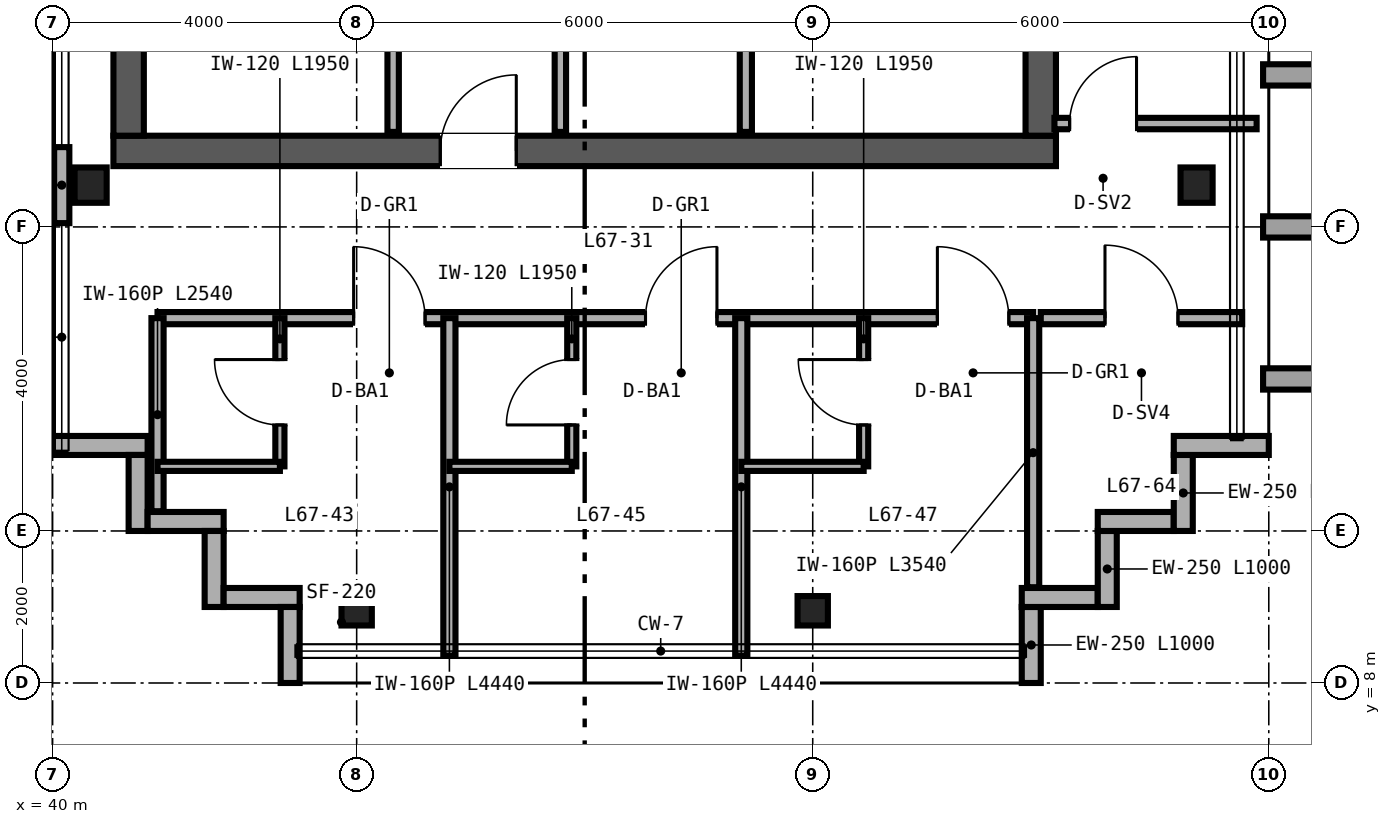
"""IFC4 building model, lengths in metres.
Left out: names, types, materials, properties, quantities, classifications, styles, units other than length and angle.
Written with IfcOpenShell. Run it as: python <this file> out.ifc"""

import sys

from ifc_helpers import new_model, si_unit, direction, frame, frame_2d, origin, origin_2d, place, context, subcontext, project, spatial, rectangle, i_section, extrude, source, transform, mapped, element, fill, save


model = new_model("IFC4")
c1 = context("Model", 3, precision=1e-05, world=origin(), true_north=direction((0.0, 1.0)))
c2 = subcontext(c1, "Body", "Model", "MODEL_VIEW")
j1 = project(units=[si_unit("LENGTHUNIT", "METRE"), si_unit("PLANEANGLEUNIT", "RADIAN")], contexts=[c1])
p1 = place(None, origin())
s1 = spatial("IfcSite", under=j1, at=p1, CompositionType="ELEMENT")
p2 = place(p1, origin())
s2 = spatial("IfcBuilding", under=s1, at=p2, CompositionType="ELEMENT")
p3 = place(p2, frame((0.0, 0.0, 265.2)))
s3 = spatial("IfcBuildingStorey", under=s2, at=p3, CompositionType="ELEMENT", Elevation=265.2)
p4 = place(p3, frame((40.8, 15.0, 0.0), z_axis=(0.0, 0.0, 1.0), x_axis=(1.0, 0.0, 0.0)))
e1 = element("IfcWall", 1, at=p4, inside=s3, PredefinedType="SHEAR", context=c2, shape_type="SweptSolid", body=[
    extrude(rectangle(XDim=12.4, YDim=0.4, at=frame_2d((6.2, 0.0))), origin(), (0.0, 0.0, 1.0), 3.38),
])
p5 = place(p4, frame((4.3, 0.0, 0.0)))
e2 = element("IfcOpeningElement", 2, at=p5, cuts=e1, PredefinedType="OPENING", context=c2, shape_type="SweptSolid", body=[
    extrude(rectangle(XDim=1.0, YDim=2.15, at=frame_2d((0.5, 1.075))), frame((0.0, 0.21, 0.0), z_axis=(0.0, -1.0, 0.0), x_axis=(1.0, 0.0, 0.0)), (0.0, 0.0, 1.0), 0.42),
])
for number, where, z_axis, x_axis in (
    (3, (41.0, 15.2, 0.0), (0.0, 0.0, 1.0), (0.0, 1.0, 0.0)),
    (4, (53.0, 15.2, 0.0), (0.0, 0.0, 1.0), (0.0, 1.0, 0.0)),
):
    element("IfcWall", number, at=place(p3, frame(where, z_axis=z_axis, x_axis=x_axis)), inside=s3, PredefinedType="SHEAR", context=c2, shape_type="SweptSolid", body=[
        extrude(rectangle(XDim=21.6, YDim=0.4, at=frame_2d((10.8, 0.0))), origin(), (0.0, 0.0, 1.0), 3.38),
    ])
m1 = source(origin(), c2, "Body", "SweptSolid", [
    extrude(i_section(OverallWidth=0.422, OverallDepth=0.465, WebThickness=0.045, FlangeThickness=0.073, FilletRadius=0.025, at=origin_2d()), origin(), (0.0, 0.0, 1.0), 3.38),
])
for number, where, z_axis, x_axis in (
    (5, (40.5, 14.55, 0.0), (0.0, 0.0, 1.0), (1.0, 0.0, 0.0)),
    (6, (55.05, 14.55, 0.0), (0.0, 0.0, 1.0), (1.0, 0.0, 0.0)),
):
    element("IfcColumn", number, at=place(p3, frame(where, z_axis=z_axis, x_axis=x_axis)), inside=s3, PredefinedType="COLUMN", context=c2, shape_type="MappedRepresentation", body=[
        mapped(m1, transform((0.0, 0.0, 0.0), scale=1.0)),
    ])
m2 = source(origin(), c2, "Body", "SweptSolid", [
    extrude(i_section(OverallWidth=0.399, OverallDepth=0.387, WebThickness=0.021, FlangeThickness=0.033, FilletRadius=0.025, at=origin_2d()), origin(), (0.0, 0.0, 1.0), 3.38),
])
for number, where, z_axis, x_axis in (
    (7, (44.0, 8.95, 0.0), (0.0, 0.0, 1.0), (1.0, 0.0, 0.0)),
    (8, (50.0, 8.95, 0.0), (0.0, 0.0, 1.0), (1.0, 0.0, 0.0)),
):
    element("IfcColumn", number, at=place(p3, frame(where, z_axis=z_axis, x_axis=x_axis)), inside=s3, PredefinedType="COLUMN", context=c2, shape_type="MappedRepresentation", body=[
        mapped(m2, transform((0.0, 0.0, 0.0), scale=1.0)),
    ])
for number, where, z_axis, x_axis in (
    (9, (52.875, 8.0, 0.0), (0.0, 0.0, 1.0), (0.0, 1.0, 0.0)),
    (10, (52.75, 9.125, 0.0), (0.0, 0.0, 1.0), (1.0, 0.0, 0.0)),
    (11, (53.875, 9.0, 0.0), (0.0, 0.0, 1.0), (0.0, 1.0, 0.0)),
    (12, (53.75, 10.125, 0.0), (0.0, 0.0, 1.0), (1.0, 0.0, 0.0)),
    (13, (54.875, 10.0, 0.0), (0.0, 0.0, 1.0), (0.0, 1.0, 0.0)),
):
    element("IfcWall", number, at=place(p3, frame(where, z_axis=z_axis, x_axis=x_axis)), inside=s3, PredefinedType="SOLIDWALL", context=c2, shape_type="SweptSolid", body=[
        extrude(rectangle(XDim=1.0, YDim=0.25, at=frame_2d((0.5, 0.0))), origin(), (0.0, 0.0, 1.0), 3.38),
    ])
for number, where, z_axis, x_axis in (
    (14, (54.75, 11.125, 0.0), (0.0, 0.0, 1.0), (1.0, 0.0, 0.0)),
    (15, (40.0, 11.125, 0.0), (0.0, 0.0, 1.0), (1.0, 0.0, 0.0)),
):
    element("IfcWall", number, at=place(p3, frame(where, z_axis=z_axis, x_axis=x_axis)), inside=s3, PredefinedType="SOLIDWALL", context=c2, shape_type="SweptSolid", body=[
        extrude(rectangle(XDim=1.25, YDim=0.25, at=frame_2d((0.625, 0.0))), origin(), (0.0, 0.0, 1.0), 3.38),
    ])
for number, where, z_axis, x_axis in (
    (16, (41.125, 11.0, 0.0), (0.0, 0.0, 1.0), (0.0, -1.0, 0.0)),
    (17, (41.25, 10.125, 0.0), (0.0, 0.0, 1.0), (1.0, 0.0, 0.0)),
    (18, (42.125, 10.0, 0.0), (0.0, 0.0, 1.0), (0.0, -1.0, 0.0)),
    (19, (42.25, 9.125, 0.0), (0.0, 0.0, 1.0), (1.0, 0.0, 0.0)),
    (20, (43.125, 9.0, 0.0), (0.0, 0.0, 1.0), (0.0, -1.0, 0.0)),
):
    element("IfcWall", number, at=place(p3, frame(where, z_axis=z_axis, x_axis=x_axis)), inside=s3, PredefinedType="SOLIDWALL", context=c2, shape_type="SweptSolid", body=[
        extrude(rectangle(XDim=1.0, YDim=0.25, at=frame_2d((0.5, 0.0))), origin(), (0.0, 0.0, 1.0), 3.38),
    ])
p6 = place(p3, frame((40.12, 14.05, 0.0), z_axis=(0.0, 0.0, 1.0), x_axis=(0.0, 1.0, 0.0)))
e21 = element("IfcWall", 21, at=p6, inside=s3, PredefinedType="PARAPET", context=c2, shape_type="SweptSolid", body=[
    extrude(rectangle(XDim=1.0, YDim=0.2, at=frame_2d((0.5, 0.0))), origin(), (0.0, 0.0, 1.0), 3.38),
])
p7 = place(p3, frame((46.68, 15.25, 0.0), z_axis=(0.0, 0.0, 1.0), x_axis=(0.0, 1.0, 0.0)))
e22 = element("IfcWall", 22, at=p7, inside=s3, PredefinedType="PARTITIONING", context=c2, shape_type="SweptSolid", body=[
    extrude(rectangle(XDim=16.13, YDim=0.15, at=frame_2d((8.065, 0.0))), origin(), (0.0, 0.0, 1.0), 2.453),
])
p8 = place(p7, frame((3.2, 0.0, 0.0)))
e23 = element("IfcOpeningElement", 23, at=p8, cuts=e22, PredefinedType="OPENING", context=c2, shape_type="SweptSolid", body=[
    extrude(rectangle(XDim=0.88, YDim=2.15, at=frame_2d((0.44, 1.075))), frame((0.0, 0.085, 0.0), z_axis=(0.0, -1.0, 0.0), x_axis=(1.0, 0.0, 0.0)), (0.0, 0.0, 1.0), 0.17),
])
p9 = place(p7, frame((11.2, 0.0, 0.0)))
e24 = element("IfcOpeningElement", 24, at=p9, cuts=e22, PredefinedType="OPENING", context=c2, shape_type="SweptSolid", body=[
    extrude(rectangle(XDim=0.88, YDim=2.15, at=frame_2d((0.44, 1.075))), frame((0.0, 0.085, 0.0), z_axis=(0.0, -1.0, 0.0), x_axis=(1.0, 0.0, 0.0)), (0.0, 0.0, 1.0), 0.17),
])
p10 = place(p3, frame((49.12, 15.25, 0.0), z_axis=(0.0, 0.0, 1.0), x_axis=(0.0, 1.0, 0.0)))
e25 = element("IfcWall", 25, at=p10, inside=s3, PredefinedType="PARTITIONING", context=c2, shape_type="SweptSolid", body=[
    extrude(rectangle(XDim=16.13, YDim=0.16, at=frame_2d((8.065, 0.0))), origin(), (0.0, 0.0, 1.0), 2.453),
])
p11 = place(p10, frame((2.2, 0.0, 0.0)))
e26 = element("IfcOpeningElement", 26, at=p11, cuts=e25, PredefinedType="OPENING", context=c2, shape_type="SweptSolid", body=[
    extrude(rectangle(XDim=0.9, YDim=2.15, at=frame_2d((0.45, 1.075))), frame((0.0, 0.09, 0.0), z_axis=(0.0, -1.0, 0.0), x_axis=(1.0, 0.0, 0.0)), (0.0, 0.0, 1.0), 0.18),
])
p12 = place(p10, frame((8.2, 0.0, 0.0)))
e27 = element("IfcOpeningElement", 27, at=p12, cuts=e25, PredefinedType="OPENING", context=c2, shape_type="SweptSolid", body=[
    extrude(rectangle(XDim=0.9, YDim=2.15, at=frame_2d((0.45, 1.075))), frame((0.0, 0.09, 0.0), z_axis=(0.0, -1.0, 0.0), x_axis=(1.0, 0.0, 0.0)), (0.0, 0.0, 1.0), 0.18),
])
p13 = place(p10, frame((13.5, 0.0, 0.0)))
e28 = element("IfcOpeningElement", 28, at=p13, cuts=e25, PredefinedType="OPENING", context=c2, shape_type="SweptSolid", body=[
    extrude(rectangle(XDim=0.9, YDim=2.15, at=frame_2d((0.45, 1.075))), frame((0.0, 0.09, 0.0), z_axis=(0.0, -1.0, 0.0), x_axis=(1.0, 0.0, 0.0)), (0.0, 0.0, 1.0), 0.18),
])
p14 = place(p3, frame((44.48, 15.25, 0.0), z_axis=(0.0, 0.0, 1.0), x_axis=(0.0, 1.0, 0.0)))
e29 = element("IfcWall", 29, at=p14, inside=s3, PredefinedType="PARTITIONING", context=c2, shape_type="SweptSolid", body=[
    extrude(rectangle(XDim=16.13, YDim=0.15, at=frame_2d((8.065, 0.0))), origin(), (0.0, 0.0, 1.0), 2.453),
])
p15 = place(p14, frame((2.2, 0.0, 0.0)))
e30 = element("IfcOpeningElement", 30, at=p15, cuts=e29, PredefinedType="OPENING", context=c2, shape_type="SweptSolid", body=[
    extrude(rectangle(XDim=0.9, YDim=2.15, at=frame_2d((0.45, 1.075))), frame((0.0, 0.085, 0.0), z_axis=(0.0, -1.0, 0.0), x_axis=(1.0, 0.0, 0.0)), (0.0, 0.0, 1.0), 0.17),
])
p16 = place(p14, frame((10.13, 0.0, 0.0)))
e31 = element("IfcOpeningElement", 31, at=p16, cuts=e29, PredefinedType="OPENING", context=c2, shape_type="SweptSolid", body=[
    extrude(rectangle(XDim=0.9, YDim=2.15, at=frame_2d((0.45, 1.075))), frame((0.0, 0.085, 0.0), z_axis=(0.0, -1.0, 0.0), x_axis=(1.0, 0.0, 0.0)), (0.0, 0.0, 1.0), 0.17),
])
p17 = place(p3, frame((41.38, 12.8, 0.0), z_axis=(0.0, 0.0, 1.0), x_axis=(1.0, 0.0, 0.0)))
e32 = element("IfcWall", 32, at=p17, inside=s3, PredefinedType="PARTITIONING", context=c2, shape_type="SweptSolid", body=[
    extrude(rectangle(XDim=11.52, YDim=0.16, at=frame_2d((5.76, 0.0))), origin(), (0.0, 0.0, 1.0), 3.38),
])
p18 = place(p17, frame((2.58, 0.0, 0.0)))
e33 = element("IfcOpeningElement", 33, at=p18, cuts=e32, PredefinedType="OPENING", context=c2, shape_type="SweptSolid", body=[
    extrude(rectangle(XDim=0.94, YDim=2.15, at=frame_2d((0.47, 1.075))), frame((0.0, 0.09, 0.0), z_axis=(0.0, -1.0, 0.0), x_axis=(1.0, 0.0, 0.0)), (0.0, 0.0, 1.0), 0.18),
])
p19 = place(p17, frame((6.42, 0.0, 0.0)))
e34 = element("IfcOpeningElement", 34, at=p19, cuts=e32, PredefinedType="OPENING", context=c2, shape_type="SweptSolid", body=[
    extrude(rectangle(XDim=0.94, YDim=2.15, at=frame_2d((0.47, 1.075))), frame((0.0, 0.09, 0.0), z_axis=(0.0, -1.0, 0.0), x_axis=(1.0, 0.0, 0.0)), (0.0, 0.0, 1.0), 0.18),
])
p20 = place(p17, frame((10.26, 0.0, 0.0)))
e35 = element("IfcOpeningElement", 35, at=p20, cuts=e32, PredefinedType="OPENING", context=c2, shape_type="SweptSolid", body=[
    extrude(rectangle(XDim=0.94, YDim=2.15, at=frame_2d((0.47, 1.075))), frame((0.0, 0.09, 0.0), z_axis=(0.0, -1.0, 0.0), x_axis=(1.0, 0.0, 0.0)), (0.0, 0.0, 1.0), 0.18),
])
p21 = place(p3, frame((41.38, 10.26, 0.0), z_axis=(0.0, 0.0, 1.0), x_axis=(0.0, 1.0, 0.0)))
e36 = element("IfcWall", 36, at=p21, inside=s3, PredefinedType="PARTITIONING", context=c2, shape_type="SweptSolid", body=[
    extrude(rectangle(XDim=2.54, YDim=0.16, at=frame_2d((1.27, 0.0))), origin(), (0.0, 0.0, 1.0), 3.38),
])
p22 = place(p3, frame((52.9, 9.26, 0.0), z_axis=(0.0, 0.0, 1.0), x_axis=(0.0, 1.0, 0.0)))
e37 = element("IfcWall", 37, at=p22, inside=s3, PredefinedType="PARTITIONING", context=c2, shape_type="SweptSolid", body=[
    extrude(rectangle(XDim=3.54, YDim=0.16, at=frame_2d((1.77, 0.0))), origin(), (0.0, 0.0, 1.0), 3.38),
])
p23 = place(p3, frame((45.22, 8.36, 0.0), z_axis=(0.0, 0.0, 1.0), x_axis=(0.0, 1.0, 0.0)))
e38 = element("IfcWall", 38, at=p23, inside=s3, PredefinedType="PARTITIONING", context=c2, shape_type="SweptSolid", body=[
    extrude(rectangle(XDim=4.44, YDim=0.16, at=frame_2d((2.22, 0.0))), origin(), (0.0, 0.0, 1.0), 2.687),
])
p24 = place(p3, frame((42.99, 10.85, 0.0), z_axis=(0.0, 0.0, 1.0), x_axis=(0.0, 1.0, 0.0)))
e39 = element("IfcWall", 39, at=p24, inside=s3, PredefinedType="PARTITIONING", context=c2, shape_type="SweptSolid", body=[
    extrude(rectangle(XDim=1.95, YDim=0.12, at=frame_2d((0.975, 0.0))), origin(), (0.0, 0.0, 1.0), 3.38),
])
p25 = place(p24, frame((0.545, 0.0, 0.0)))
e40 = element("IfcOpeningElement", 40, at=p25, cuts=e39, PredefinedType="OPENING", context=c2, shape_type="SweptSolid", body=[
    extrude(rectangle(XDim=0.86, YDim=2.1, at=frame_2d((0.43, 1.05))), frame((0.0, 0.07, 0.0), z_axis=(0.0, -1.0, 0.0), x_axis=(1.0, 0.0, 0.0)), (0.0, 0.0, 1.0), 0.14),
])
p26 = place(p3, frame((41.38, 10.85, 0.0), z_axis=(0.0, 0.0, 1.0), x_axis=(1.0, 0.0, 0.0)))
e41 = element("IfcWall", 41, at=p26, inside=s3, PredefinedType="PARTITIONING", context=c2, shape_type="SweptSolid", body=[
    extrude(rectangle(XDim=1.61, YDim=0.12, at=frame_2d((0.805, 0.0))), origin(), (0.0, 0.0, 1.0), 3.38),
])
p27 = place(p3, frame((49.06, 8.36, 0.0), z_axis=(0.0, 0.0, 1.0), x_axis=(0.0, 1.0, 0.0)))
e42 = element("IfcWall", 42, at=p27, inside=s3, PredefinedType="PARTITIONING", context=c2, shape_type="SweptSolid", body=[
    extrude(rectangle(XDim=4.44, YDim=0.16, at=frame_2d((2.22, 0.0))), origin(), (0.0, 0.0, 1.0), 2.687),
])
p28 = place(p3, frame((46.83, 10.85, 0.0), z_axis=(0.0, 0.0, 1.0), x_axis=(0.0, 1.0, 0.0)))
e43 = element("IfcWall", 43, at=p28, inside=s3, PredefinedType="PARTITIONING", context=c2, shape_type="SweptSolid", body=[
    extrude(rectangle(XDim=1.95, YDim=0.12, at=frame_2d((0.975, 0.0))), origin(), (0.0, 0.0, 1.0), 3.38),
])
p29 = place(p28, frame((0.545, 0.0, 0.0)))
e44 = element("IfcOpeningElement", 44, at=p29, cuts=e43, PredefinedType="OPENING", context=c2, shape_type="SweptSolid", body=[
    extrude(rectangle(XDim=0.86, YDim=2.1, at=frame_2d((0.43, 1.05))), frame((0.0, 0.07, 0.0), z_axis=(0.0, -1.0, 0.0), x_axis=(1.0, 0.0, 0.0)), (0.0, 0.0, 1.0), 0.14),
])
p30 = place(p3, frame((45.22, 10.85, 0.0), z_axis=(0.0, 0.0, 1.0), x_axis=(1.0, 0.0, 0.0)))
e45 = element("IfcWall", 45, at=p30, inside=s3, PredefinedType="PARTITIONING", context=c2, shape_type="SweptSolid", body=[
    extrude(rectangle(XDim=1.61, YDim=0.12, at=frame_2d((0.805, 0.0))), origin(), (0.0, 0.0, 1.0), 3.38),
])
p31 = place(p3, frame((50.67, 10.85, 0.0), z_axis=(0.0, 0.0, 1.0), x_axis=(0.0, 1.0, 0.0)))
e46 = element("IfcWall", 46, at=p31, inside=s3, PredefinedType="PARTITIONING", context=c2, shape_type="SweptSolid", body=[
    extrude(rectangle(XDim=1.95, YDim=0.12, at=frame_2d((0.975, 0.0))), origin(), (0.0, 0.0, 1.0), 3.38),
])
p32 = place(p31, frame((0.545, 0.0, 0.0)))
e47 = element("IfcOpeningElement", 47, at=p32, cuts=e46, PredefinedType="OPENING", context=c2, shape_type="SweptSolid", body=[
    extrude(rectangle(XDim=0.86, YDim=2.1, at=frame_2d((0.43, 1.05))), frame((0.0, 0.07, 0.0), z_axis=(0.0, -1.0, 0.0), x_axis=(1.0, 0.0, 0.0)), (0.0, 0.0, 1.0), 0.14),
])
p33 = place(p3, frame((49.06, 10.85, 0.0), z_axis=(0.0, 0.0, 1.0), x_axis=(1.0, 0.0, 0.0)))
e48 = element("IfcWall", 48, at=p33, inside=s3, PredefinedType="PARTITIONING", context=c2, shape_type="SweptSolid", body=[
    extrude(rectangle(XDim=1.61, YDim=0.12, at=frame_2d((0.805, 0.0))), origin(), (0.0, 0.0, 1.0), 3.38),
])
p34 = place(p3, frame((53.18, 15.36, 0.0), z_axis=(0.0, 0.0, 1.0), x_axis=(1.0, 0.0, 0.0)))
e49 = element("IfcWall", 49, at=p34, inside=s3, PredefinedType="PARTITIONING", context=c2, shape_type="SweptSolid", body=[
    extrude(rectangle(XDim=2.66, YDim=0.15, at=frame_2d((1.33, 0.0))), origin(), (0.0, 0.0, 1.0), 2.601),
])
p35 = place(p34, frame((0.2, 0.0, 0.0)))
e50 = element("IfcOpeningElement", 50, at=p35, cuts=e49, PredefinedType="OPENING", context=c2, shape_type="SweptSolid", body=[
    extrude(rectangle(XDim=0.88, YDim=2.15, at=frame_2d((0.44, 1.075))), frame((0.0, 0.085, 0.0), z_axis=(0.0, -1.0, 0.0), x_axis=(1.0, 0.0, 0.0)), (0.0, 0.0, 1.0), 0.17),
])
p36 = place(p3, frame((53.0, 12.8, 0.0), z_axis=(0.0, 0.0, 1.0), x_axis=(1.0, 0.0, 0.0)))
e51 = element("IfcWall", 51, at=p36, inside=s3, PredefinedType="PARTITIONING", context=c2, shape_type="SweptSolid", body=[
    extrude(rectangle(XDim=2.65, YDim=0.16, at=frame_2d((1.325, 0.0))), origin(), (0.0, 0.0, 1.0), 3.38),
])
p37 = place(p36, frame((0.845, 0.0, 0.0)))
e52 = element("IfcOpeningElement", 52, at=p37, cuts=e51, PredefinedType="OPENING", context=c2, shape_type="SweptSolid", body=[
    extrude(rectangle(XDim=0.96, YDim=2.15, at=frame_2d((0.48, 1.075))), frame((0.0, 0.09, 0.0), z_axis=(0.0, -1.0, 0.0), x_axis=(1.0, 0.0, 0.0)), (0.0, 0.0, 1.0), 0.18),
])
m3 = source(origin(), c2, "Body", "SweptSolid", [
    extrude(rectangle(XDim=1.0, YDim=2.15, at=frame_2d((0.5, 1.075))), frame((0.0, 0.025, 0.0), z_axis=(0.0, -1.0, 0.0), x_axis=(1.0, 0.0, 0.0)), (0.0, 0.0, 1.0), 0.05),
])
p38 = place(p5, origin())
e53 = element("IfcDoor", 53, at=p38, inside=s3, OperationType="SINGLE_SWING_RIGHT", PredefinedType="DOOR", context=c2, shape_type="MappedRepresentation", body=[
    mapped(m3, transform((0.0, 0.0, 0.0), scale=1.0)),
])
fill(e2, e53)
m4 = source(origin(), c2, "Body", "SweptSolid", [
    extrude(rectangle(XDim=0.86, YDim=2.1, at=frame_2d((0.43, 1.05))), frame((0.0, 0.025, 0.0), z_axis=(0.0, -1.0, 0.0), x_axis=(1.0, 0.0, 0.0)), (0.0, 0.0, 1.0), 0.05),
])
p39 = place(p25, origin())
e54 = element("IfcDoor", 54, at=p39, inside=s3, OperationType="SINGLE_SWING_RIGHT", PredefinedType="DOOR", context=c2, shape_type="MappedRepresentation", body=[
    mapped(m4, transform((0.0, 0.0, 0.0), scale=1.0)),
])
fill(e40, e54)
p40 = place(p29, origin())
e55 = element("IfcDoor", 55, at=p40, inside=s3, OperationType="SINGLE_SWING_LEFT", PredefinedType="DOOR", context=c2, shape_type="MappedRepresentation", body=[
    mapped(m4, transform((0.0, 0.0, 0.0), scale=1.0)),
])
fill(e44, e55)
p41 = place(p32, origin())
e56 = element("IfcDoor", 56, at=p41, inside=s3, OperationType="SINGLE_SWING_RIGHT", PredefinedType="DOOR", context=c2, shape_type="MappedRepresentation", body=[
    mapped(m4, transform((0.0, 0.0, 0.0), scale=1.0)),
])
fill(e47, e56)
m5 = source(origin(), c2, "Body", "SweptSolid", [
    extrude(rectangle(XDim=0.94, YDim=2.15, at=frame_2d((0.47, 1.075))), frame((0.0, 0.025, 0.0), z_axis=(0.0, -1.0, 0.0), x_axis=(1.0, 0.0, 0.0)), (0.0, 0.0, 1.0), 0.05),
])
p42 = place(p18, origin())
e57 = element("IfcDoor", 57, at=p42, inside=s3, OperationType="SINGLE_SWING_LEFT", PredefinedType="DOOR", context=c2, shape_type="MappedRepresentation", body=[
    mapped(m5, transform((0.0, 0.0, 0.0), scale=1.0)),
])
fill(e33, e57)
p43 = place(p19, origin())
e58 = element("IfcDoor", 58, at=p43, inside=s3, OperationType="SINGLE_SWING_RIGHT", PredefinedType="DOOR", context=c2, shape_type="MappedRepresentation", body=[
    mapped(m5, transform((0.0, 0.0, 0.0), scale=1.0)),
])
fill(e34, e58)
p44 = place(p20, origin())
e59 = element("IfcDoor", 59, at=p44, inside=s3, OperationType="SINGLE_SWING_LEFT", PredefinedType="DOOR", context=c2, shape_type="MappedRepresentation", body=[
    mapped(m5, transform((0.0, 0.0, 0.0), scale=1.0)),
])
fill(e35, e59)
m6 = source(origin(), c2, "Body", "SweptSolid", [
    extrude(rectangle(XDim=0.88, YDim=2.15, at=frame_2d((0.44, 1.075))), frame((0.0, 0.025, 0.0), z_axis=(0.0, -1.0, 0.0), x_axis=(1.0, 0.0, 0.0)), (0.0, 0.0, 1.0), 0.05),
])
p45 = place(p35, origin())
e60 = element("IfcDoor", 60, at=p45, inside=s3, OperationType="SINGLE_SWING_RIGHT", PredefinedType="DOOR", context=c2, shape_type="MappedRepresentation", body=[
    mapped(m6, transform((0.0, 0.0, 0.0), scale=1.0)),
])
fill(e50, e60)
m7 = source(origin(), c2, "Body", "SweptSolid", [
    extrude(rectangle(XDim=0.96, YDim=2.15, at=frame_2d((0.48, 1.075))), frame((0.0, 0.025, 0.0), z_axis=(0.0, -1.0, 0.0), x_axis=(1.0, 0.0, 0.0)), (0.0, 0.0, 1.0), 0.05),
])
p46 = place(p37, origin())
e61 = element("IfcDoor", 61, at=p46, inside=s3, OperationType="SINGLE_SWING_LEFT", PredefinedType="DOOR", context=c2, shape_type="MappedRepresentation", body=[
    mapped(m7, transform((0.0, 0.0, 0.0), scale=1.0)),
])
fill(e52, e61)
save(model, sys.argv[1])
